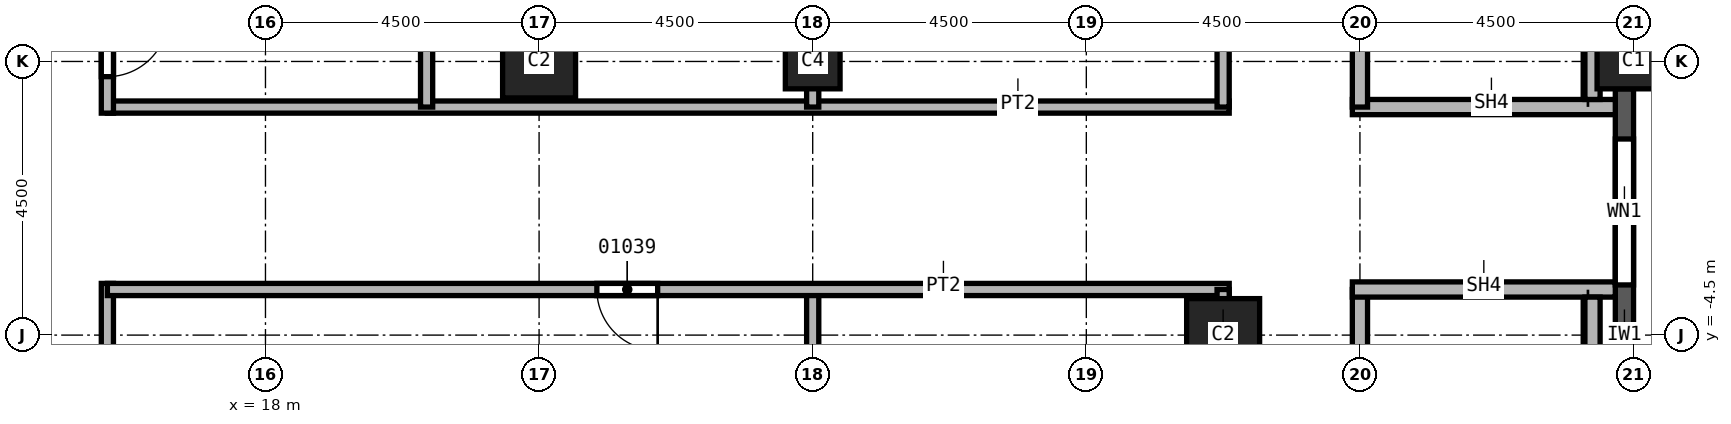
"""IFC4 building model, lengths in metres.
Left out: names, types, materials, properties, quantities, classifications, styles, units other than length and angle.
Written with IfcOpenShell. Run it as: python <this file> out.ifc"""

import sys

from ifc_helpers import new_model, si_unit, direction, frame, frame_2d, origin, origin_2d, place, context, subcontext, project, spatial, rectangle, extrude, element, fill, save


model = new_model("IFC4")
c1 = context("Model", 3, precision=1e-05, world=origin(), true_north=direction((0.0, 1.0)))
c2 = subcontext(c1, "Body", "Model", "MODEL_VIEW")
j1 = project(units=[si_unit("LENGTHUNIT", "METRE"), si_unit("PLANEANGLEUNIT", "RADIAN")], contexts=[c1])
p1 = place(None, origin())
s1 = spatial("IfcSite", under=j1, at=p1, CompositionType="ELEMENT")
p2 = place(p1, origin())
s2 = spatial("IfcBuilding", under=s1, at=p2, CompositionType="ELEMENT")
p3 = place(p2, frame((0.0, 0.0, 72.0)))
s3 = spatial("IfcBuildingStorey", under=s2, at=p3, CompositionType="ELEMENT", Elevation=72.0)
p4 = place(p3, frame((40.5, 0.0, 0.0), z_axis=(0.0, 0.0, 1.0), x_axis=(0.0, 1.0, 0.0)))
e1 = element("IfcColumn", 1, at=p4, inside=s3, PredefinedType="COLUMN", context=c2, shape_type="SweptSolid", body=[
    extrude(rectangle(XDim=0.9, YDim=1.2, at=origin_2d()), origin(), (0.0, 0.0, 1.0), 3.7),
])
for number, where, z_axis, x_axis in (
    (2, (33.75, -4.5, 0.0), (0.0, 0.0, 1.0), (1.0, 0.0, 0.0)),
    (3, (22.5, 0.0, 0.0), (0.0, 0.0, 1.0), (1.0, 0.0, 0.0)),
):
    element("IfcColumn", number, at=place(p3, frame(where, z_axis=z_axis, x_axis=x_axis)), inside=s3, PredefinedType="COLUMN", context=c2, shape_type="SweptSolid", body=[
        extrude(rectangle(XDim=1.2, YDim=1.2, at=origin_2d()), origin(), (0.0, 0.0, 1.0), 3.7),
    ])
p5 = place(p3, frame((27.0, 0.0, 0.0), z_axis=(0.0, 0.0, 1.0), x_axis=(1.0, 0.0, 0.0)))
e4 = element("IfcColumn", 4, at=p5, inside=s3, PredefinedType="COLUMN", context=c2, shape_type="SweptSolid", body=[
    extrude(rectangle(XDim=0.9, YDim=0.9, at=origin_2d()), origin(), (0.0, 0.0, 1.0), 3.7),
])
p6 = place(p3, frame((40.35, -8.55, 0.0), z_axis=(0.0, 0.0, 1.0), x_axis=(0.0, 1.0, 0.0)))
e5 = element("IfcWall", 5, at=p6, inside=s3, PredefinedType="SOLIDWALL", context=c2, shape_type="SweptSolid", body=[
    extrude(rectangle(XDim=8.1, YDim=0.3, at=frame_2d((4.05, 0.0))), origin(), (0.0, 0.0, 1.0), 3.1),
])
p7 = place(p6, frame((0.825, 0.0, 0.8)))
e6 = element("IfcOpeningElement", 6, at=p7, cuts=e5, PredefinedType="OPENING", context=c2, shape_type="SweptSolid", body=[
    extrude(rectangle(XDim=2.4, YDim=1.95, at=frame_2d((1.2, 0.975))), frame((0.0, 0.15, 0.0), z_axis=(0.0, -1.0, 0.0), x_axis=(1.0, 0.0, 0.0)), (0.0, 0.0, 1.0), 0.3),
])
p8 = place(p6, frame((4.875, 0.0, 0.8)))
e7 = element("IfcOpeningElement", 7, at=p8, cuts=e5, PredefinedType="OPENING", context=c2, shape_type="SweptSolid", body=[
    extrude(rectangle(XDim=2.4, YDim=1.95, at=frame_2d((1.2, 0.975))), frame((0.0, 0.15, 0.0), z_axis=(0.0, -1.0, 0.0), x_axis=(1.0, 0.0, 0.0)), (0.0, 0.0, 1.0), 0.3),
])
p9 = place(p3, frame((15.4, -3.65, 0.0), z_axis=(0.0, 0.0, 1.0), x_axis=(0.0, -1.0, 0.0)))
e8 = element("IfcWall", 8, at=p9, inside=s3, PredefinedType="PARTITIONING", context=c2, shape_type="SweptSolid", body=[
    extrude(rectangle(XDim=20.85, YDim=0.2, at=frame_2d((10.425, 0.0))), origin(), (0.0, 0.0, 1.0), 3.7),
])
p10 = place(p9, frame((12.7, 0.0, 0.0)))
e9 = element("IfcOpeningElement", 9, at=p10, cuts=e8, PredefinedType="OPENING", context=c2, shape_type="SweptSolid", body=[
    extrude(rectangle(XDim=1.0, YDim=2.1, at=frame_2d((0.5, 1.05))), frame((0.0, 0.1, 0.0), z_axis=(0.0, -1.0, 0.0), x_axis=(1.0, 0.0, 0.0)), (0.0, 0.0, 1.0), 0.2),
])
p11 = place(p3, frame((15.4, -0.75, 0.0), z_axis=(0.0, 0.0, 1.0), x_axis=(1.0, 0.0, 0.0)))
e10 = element("IfcWall", 10, at=p11, inside=s3, PredefinedType="PARTITIONING", context=c2, shape_type="SweptSolid", body=[
    extrude(rectangle(XDim=18.45, YDim=0.2, at=frame_2d((9.225, 0.0))), origin(), (0.0, 0.0, 1.0), 3.7),
])
p12 = place(p3, frame((15.4, 24.5, 0.0), z_axis=(0.0, 0.0, 1.0), x_axis=(0.0, -1.0, 0.0)))
e11 = element("IfcWall", 11, at=p12, inside=s3, PredefinedType="PARTITIONING", context=c2, shape_type="SweptSolid", body=[
    extrude(rectangle(XDim=25.35, YDim=0.2, at=frame_2d((12.675, 0.0))), origin(), (0.0, 0.0, 1.0), 3.7),
])
p13 = place(p12, frame((23.75, 0.0, 0.0)))
e12 = element("IfcOpeningElement", 12, at=p13, cuts=e11, PredefinedType="OPENING", context=c2, shape_type="SweptSolid", body=[
    extrude(rectangle(XDim=1.0, YDim=2.1, at=frame_2d((0.5, 1.05))), frame((0.0, 0.1, 0.0), z_axis=(0.0, -1.0, 0.0), x_axis=(1.0, 0.0, 0.0)), (0.0, 0.0, 1.0), 0.2),
])
p14 = place(p12, frame((12.5, 0.0, 0.0)))
e13 = element("IfcOpeningElement", 13, at=p14, cuts=e11, PredefinedType="OPENING", context=c2, shape_type="SweptSolid", body=[
    extrude(rectangle(XDim=1.0, YDim=2.1, at=frame_2d((0.5, 1.05))), frame((0.0, 0.1, 0.0), z_axis=(0.0, -1.0, 0.0), x_axis=(1.0, 0.0, 0.0)), (0.0, 0.0, 1.0), 0.2),
])
p15 = place(p12, frame((2.8, 0.0, 0.0)))
e14 = element("IfcOpeningElement", 14, at=p15, cuts=e11, PredefinedType="OPENING", context=c2, shape_type="SweptSolid", body=[
    extrude(rectangle(XDim=1.0, YDim=2.1, at=frame_2d((0.5, 1.05))), frame((0.0, 0.1, 0.0), z_axis=(0.0, -1.0, 0.0), x_axis=(1.0, 0.0, 0.0)), (0.0, 0.0, 1.0), 0.2),
])
p16 = place(p3, frame((20.65, 6.85, 0.0), z_axis=(0.0, 0.0, 1.0), x_axis=(0.0, -1.0, 0.0)))
e15 = element("IfcWall", 15, at=p16, inside=s3, PredefinedType="PARTITIONING", context=c2, shape_type="SweptSolid", body=[
    extrude(rectangle(XDim=7.6, YDim=0.2, at=frame_2d((3.8, 0.0))), origin(), (0.0, 0.0, 1.0), 3.7),
])
p17 = place(p16, frame((5.05, 0.0, 0.0)))
e16 = element("IfcOpeningElement", 16, at=p17, cuts=e15, PredefinedType="OPENING", context=c2, shape_type="SweptSolid", body=[
    extrude(rectangle(XDim=1.0, YDim=2.1, at=frame_2d((0.5, 1.05))), frame((0.0, 0.1, 0.0), z_axis=(0.0, -1.0, 0.0), x_axis=(1.0, 0.0, 0.0)), (0.0, 0.0, 1.0), 0.2),
])
p18 = place(p3, frame((27.0, -3.75, 0.0), z_axis=(0.0, 0.0, 1.0), x_axis=(0.0, -1.0, 0.0)))
e17 = element("IfcWall", 17, at=p18, inside=s3, PredefinedType="PARTITIONING", context=c2, shape_type="SweptSolid", body=[
    extrude(rectangle(XDim=13.65, YDim=0.2, at=frame_2d((6.825, 0.0))), origin(), (0.0, 0.0, 1.0), 3.7),
])
p19 = place(p3, frame((27.0, 17.4, 0.0), z_axis=(0.0, 0.0, 1.0), x_axis=(0.0, -1.0, 0.0)))
e18 = element("IfcWall", 18, at=p19, inside=s3, PredefinedType="PARTITIONING", context=c2, shape_type="SweptSolid", body=[
    extrude(rectangle(XDim=18.15, YDim=0.2, at=frame_2d((9.075, 0.0))), origin(), (0.0, 0.0, 1.0), 3.7),
])
p20 = place(p3, frame((33.85, -3.75, 0.0), z_axis=(0.0, 0.0, 1.0), x_axis=(-1.0, 0.0, 0.0)))
e19 = element("IfcWall", 19, at=p20, inside=s3, PredefinedType="PARTITIONING", context=c2, shape_type="SweptSolid", body=[
    extrude(rectangle(XDim=18.45, YDim=0.2, at=frame_2d((9.225, 0.0))), origin(), (0.0, 0.0, 1.0), 3.7),
])
p21 = place(p20, frame((9.4, 0.0, 0.0)))
e20 = element("IfcOpeningElement", 20, at=p21, cuts=e19, PredefinedType="OPENING", context=c2, shape_type="SweptSolid", body=[
    extrude(rectangle(XDim=1.0, YDim=2.1, at=frame_2d((0.5, 1.05))), frame((0.0, 0.1, 0.0), z_axis=(0.0, -1.0, 0.0), x_axis=(1.0, 0.0, 0.0)), (0.0, 0.0, 1.0), 0.2),
])
p22 = place(p3, frame((33.75, -11.25, 0.0), z_axis=(0.0, 0.0, 1.0), x_axis=(0.0, 1.0, 0.0)))
e21 = element("IfcWall", 21, at=p22, inside=s3, PredefinedType="PARTITIONING", context=c2, shape_type="SweptSolid", body=[
    extrude(rectangle(XDim=7.5, YDim=0.2, at=frame_2d((3.75, 0.0))), origin(), (0.0, 0.0, 1.0), 3.7),
])
p23 = place(p22, frame((0.55, 0.0, 0.0)))
e22 = element("IfcOpeningElement", 22, at=p23, cuts=e21, PredefinedType="OPENING", context=c2, shape_type="SweptSolid", body=[
    extrude(rectangle(XDim=1.0, YDim=2.1, at=frame_2d((0.5, 1.05))), frame((0.0, 0.1, 0.0), z_axis=(0.0, -1.0, 0.0), x_axis=(1.0, 0.0, 0.0)), (0.0, 0.0, 1.0), 0.2),
])
p24 = place(p3, frame((33.75, -0.75, 0.0), z_axis=(0.0, 0.0, 1.0), x_axis=(0.0, 1.0, 0.0)))
e23 = element("IfcWall", 23, at=p24, inside=s3, PredefinedType="PARTITIONING", context=c2, shape_type="SweptSolid", body=[
    extrude(rectangle(XDim=18.45, YDim=0.2, at=frame_2d((9.225, 0.0))), origin(), (0.0, 0.0, 1.0), 3.7),
])
p25 = place(p24, frame((2.35, 0.0, 0.0)))
e24 = element("IfcOpeningElement", 24, at=p25, cuts=e23, PredefinedType="OPENING", context=c2, shape_type="SweptSolid", body=[
    extrude(rectangle(XDim=1.0, YDim=2.1, at=frame_2d((0.5, 1.05))), frame((0.0, 0.1, 0.0), z_axis=(0.0, -1.0, 0.0), x_axis=(1.0, 0.0, 0.0)), (0.0, 0.0, 1.0), 0.2),
])
p26 = place(p3, frame((35.875, -0.75, 0.0), z_axis=(0.0, 0.0, 1.0), x_axis=(1.0, 0.0, 0.0)))
e25 = element("IfcWall", 25, at=p26, inside=s3, PredefinedType="SOLIDWALL", context=c2, shape_type="SweptSolid", body=[
    extrude(rectangle(XDim=4.325, YDim=0.25, at=frame_2d((2.163, 0.0))), origin(), (0.0, 0.0, 1.0), 3.7),
])
p27 = place(p3, frame((36.0, -11.375, 0.0), z_axis=(0.0, 0.0, 1.0), x_axis=(0.0, 1.0, 0.0)))
e26 = element("IfcWall", 26, at=p27, inside=s3, PredefinedType="SOLIDWALL", context=c2, shape_type="SweptSolid", body=[
    extrude(rectangle(XDim=7.625, YDim=0.25, at=frame_2d((3.812, 0.0))), origin(), (0.0, 0.0, 1.0), 3.7),
])
p28 = place(p27, frame((0.4, 0.0, 0.0)))
e27 = element("IfcOpeningElement", 27, at=p28, cuts=e26, PredefinedType="OPENING", context=c2, shape_type="SweptSolid", body=[
    extrude(rectangle(XDim=1.2, YDim=2.1, at=frame_2d((0.6, 1.05))), frame((0.0, 0.125, 0.0), z_axis=(0.0, -1.0, 0.0), x_axis=(1.0, 0.0, 0.0)), (0.0, 0.0, 1.0), 0.25),
])
p29 = place(p3, frame((36.0, -0.75, 0.0), z_axis=(0.0, 0.0, 1.0), x_axis=(0.0, 1.0, 0.0)))
e28 = element("IfcWall", 28, at=p29, inside=s3, PredefinedType="SOLIDWALL", context=c2, shape_type="SweptSolid", body=[
    extrude(rectangle(XDim=7.625, YDim=0.25, at=frame_2d((3.812, 0.0))), origin(), (0.0, 0.0, 1.0), 3.7),
])
p30 = place(p29, frame((5.95, 0.0, 0.0)))
e29 = element("IfcOpeningElement", 29, at=p30, cuts=e28, PredefinedType="OPENING", context=c2, shape_type="SweptSolid", body=[
    extrude(rectangle(XDim=1.2, YDim=2.1, at=frame_2d((0.6, 1.05))), frame((0.0, 0.125, 0.0), z_axis=(0.0, -1.0, 0.0), x_axis=(1.0, 0.0, 0.0)), (0.0, 0.0, 1.0), 0.25),
])
p31 = place(p3, frame((40.2, -3.75, 0.0), z_axis=(0.0, 0.0, 1.0), x_axis=(-1.0, 0.0, 0.0)))
e30 = element("IfcWall", 30, at=p31, inside=s3, PredefinedType="SOLIDWALL", context=c2, shape_type="SweptSolid", body=[
    extrude(rectangle(XDim=4.325, YDim=0.25, at=frame_2d((2.163, 0.0))), origin(), (0.0, 0.0, 1.0), 3.7),
])
for number, where, z_axis, x_axis in (
    (31, (39.825, -11.125, 0.0), (0.0, 0.0, 1.0), (0.0, 1.0, 0.0)),
    (32, (39.825, -0.625, 0.0), (0.0, 0.0, 1.0), (0.0, 1.0, 0.0)),
):
    element("IfcWall", number, at=place(p3, frame(where, z_axis=z_axis, x_axis=x_axis)), inside=s3, PredefinedType="SOLIDWALL", context=c2, shape_type="SweptSolid", body=[
        extrude(rectangle(XDim=7.25, YDim=0.25, at=frame_2d((3.625, 0.0))), origin(), (0.0, 0.0, 1.0), 3.7),
    ])
p32 = place(p8, origin())
e33 = element("IfcWindow", 33, at=p32, inside=s3, PartitioningType="SINGLE_PANEL", PredefinedType="WINDOW", context=c2, shape_type="SweptSolid", body=[
    extrude(rectangle(XDim=2.4, YDim=1.95, at=frame_2d((1.2, 0.975))), frame((0.0, 0.03, 0.0), z_axis=(0.0, -1.0, 0.0), x_axis=(1.0, 0.0, 0.0)), (0.0, 0.0, 1.0), 0.06),
])
fill(e7, e33)
p33 = place(p13, origin())
e34 = element("IfcDoor", 34, at=p33, inside=s3, OperationType="SINGLE_SWING_RIGHT", PredefinedType="DOOR", context=c2, shape_type="SweptSolid", body=[
    extrude(rectangle(XDim=1.0, YDim=2.1, at=frame_2d((0.5, 1.05))), frame((0.0, 0.025, 0.0), z_axis=(0.0, -1.0, 0.0), x_axis=(1.0, 0.0, 0.0)), (0.0, 0.0, 1.0), 0.05),
])
fill(e12, e34)
p34 = place(p21, origin())
e35 = element("IfcDoor", 35, at=p34, inside=s3, OperationType="SINGLE_SWING_RIGHT", PredefinedType="DOOR", context=c2, shape_type="SweptSolid", body=[
    extrude(rectangle(XDim=1.0, YDim=2.1, at=frame_2d((0.5, 1.05))), frame((0.0, 0.025, 0.0), z_axis=(0.0, -1.0, 0.0), x_axis=(1.0, 0.0, 0.0)), (0.0, 0.0, 1.0), 0.05),
])
fill(e20, e35)
save(model, sys.argv[1])
